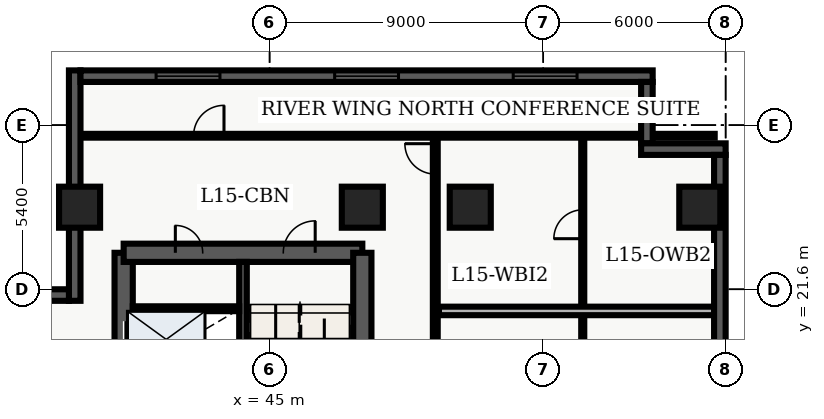
"""IFC4 building model, lengths in metres.
Left out: names, types, materials, properties, quantities, classifications, styles, units other than length and angle.
Written with IfcOpenShell. Run it as: python <this file> out.ifc"""

import sys

from ifc_helpers import new_model, entity, si_unit, converted_unit, direction, frame, origin_with_axes, origin_2d_with_axis, place, context, subcontext, project, spatial, polyline, rectangle, outline, extrude, element, fill, save


model = new_model("IFC4")
c1 = context("Model", 3, precision=1e-05, world=origin_with_axes(), true_north=direction((0.0, 1.0)))
c2 = subcontext(c1, "Body", "Model", "MODEL_VIEW")
j1 = project(units=[si_unit("LENGTHUNIT", "METRE"), converted_unit("PLANEANGLEUNIT", "DEGREE", entity("IfcPlaneAngleMeasure", 0.017), si_unit("PLANEANGLEUNIT", "RADIAN"), dimensions=[0, 0, 0, 0, 0, 0, 0])], contexts=[c1])
p1 = place(None, origin_with_axes())
s1 = spatial("IfcSite", under=j1, at=p1, CompositionType="ELEMENT")
p2 = place(p1, origin_with_axes())
s2 = spatial("IfcBuilding", under=s1, at=p2, CompositionType="ELEMENT")
p3 = place(p2, frame((0.0, 0.0, 63.9), z_axis=(0.0, 0.0, 1.0), x_axis=(1.0, 0.0, 0.0)))
s3 = spatial("IfcBuildingStorey", under=s2, at=p3, CompositionType="ELEMENT", Elevation=63.9)
p4 = place(p3, frame((40.2, 7.2, 0.0), z_axis=(0.0, 0.0, 1.0), x_axis=(0.0, 1.0, 0.0)))
e1 = element("IfcWall", 1, at=p4, inside=s3, PredefinedType="SHEAR", context=c2, shape_type="SweptSolid", body=[
    extrude(outline(polyline([(0.0, -0.3), (15.6, -0.3), (15.6, 0.3), (0.0, 0.3), (0.0, -0.3)])), origin_with_axes(), (0.0, 0.0, 1.0), 3.66),
])
p5 = place(p4, frame((12.75, 0.0, 0.0), z_axis=(0.0, 0.0, 1.0), x_axis=(1.0, 0.0, 0.0)))
e2 = element("IfcOpeningElement", 2, at=p5, cuts=e1, PredefinedType="OPENING", context=c2, shape_type="SweptSolid", body=[
    extrude(rectangle(XDim=1.2, YDim=0.62, at=origin_2d_with_axis()), origin_with_axes(), (0.0, 0.0, 1.0), 2.15),
])
p6 = place(p4, frame((9.3, 0.0, 0.0), z_axis=(0.0, 0.0, 1.0), x_axis=(1.0, 0.0, 0.0)))
e3 = element("IfcOpeningElement", 3, at=p6, cuts=e1, PredefinedType="OPENING", context=c2, shape_type="SweptSolid", body=[
    extrude(rectangle(XDim=0.9, YDim=0.62, at=origin_2d_with_axis()), origin_with_axes(), (0.0, 0.0, 1.0), 2.15),
])
p7 = place(p3, frame((40.2, 22.8, 0.0), z_axis=(0.0, 0.0, 1.0), x_axis=(1.0, 0.0, 0.0)))
e4 = element("IfcWall", 4, at=p7, inside=s3, PredefinedType="SHEAR", context=c2, shape_type="SweptSolid", body=[
    extrude(outline(polyline([(0.0, -0.3), (7.85, -0.3), (7.85, 0.3), (0.0, 0.3), (0.0, -0.3)])), origin_with_axes(), (0.0, 0.0, 1.0), 3.66),
])
p8 = place(p7, frame((5.775, 0.0, 0.0), z_axis=(0.0, 0.0, 1.0), x_axis=(1.0, 0.0, 0.0)))
e5 = element("IfcOpeningElement", 5, at=p8, cuts=e4, PredefinedType="OPENING", context=c2, shape_type="SweptSolid", body=[
    extrude(rectangle(XDim=1.05, YDim=0.62, at=origin_2d_with_axis()), origin_with_axes(), (0.0, 0.0, 1.0), 2.15),
])
p9 = place(p7, frame((2.15, 0.0, 0.0), z_axis=(0.0, 0.0, 1.0), x_axis=(1.0, 0.0, 0.0)))
e6 = element("IfcOpeningElement", 6, at=p9, cuts=e4, PredefinedType="OPENING", context=c2, shape_type="SweptSolid", body=[
    extrude(rectangle(XDim=0.9, YDim=0.62, at=origin_2d_with_axis()), origin_with_axes(), (0.0, 0.0, 1.0), 2.15),
])
p10 = place(p3, frame((48.05, 7.2, 0.0), z_axis=(0.0, 0.0, 1.0), x_axis=(0.0, 1.0, 0.0)))
e7 = element("IfcWall", 7, at=p10, inside=s3, PredefinedType="SHEAR", context=c2, shape_type="SweptSolid", body=[
    extrude(outline(polyline([(0.0, -0.3), (15.6, -0.3), (15.6, 0.3), (0.0, 0.3), (0.0, -0.3)])), origin_with_axes(), (0.0, 0.0, 1.0), 3.66),
])
p11 = place(p10, frame((1.425, 0.0, 0.0), z_axis=(0.0, 0.0, 1.0), x_axis=(1.0, 0.0, 0.0)))
e8 = element("IfcOpeningElement", 8, at=p11, cuts=e7, PredefinedType="OPENING", context=c2, shape_type="SweptSolid", body=[
    extrude(rectangle(XDim=1.05, YDim=0.62, at=origin_2d_with_axis()), origin_with_axes(), (0.0, 0.0, 1.0), 2.15),
])
p12 = place(p10, frame((3.475, 0.0, 0.0), z_axis=(0.0, 0.0, 1.0), x_axis=(1.0, 0.0, 0.0)))
e9 = element("IfcOpeningElement", 9, at=p12, cuts=e7, PredefinedType="OPENING", context=c2, shape_type="SweptSolid", body=[
    extrude(rectangle(XDim=1.05, YDim=0.62, at=origin_2d_with_axis()), origin_with_axes(), (0.0, 0.0, 1.0), 2.15),
])
p13 = place(p10, frame((5.625, 0.0, 0.0), z_axis=(0.0, 0.0, 1.0), x_axis=(1.0, 0.0, 0.0)))
e10 = element("IfcOpeningElement", 10, at=p13, cuts=e7, PredefinedType="OPENING", context=c2, shape_type="SweptSolid", body=[
    extrude(rectangle(XDim=0.95, YDim=0.62, at=origin_2d_with_axis()), origin_with_axes(), (0.0, 0.0, 1.0), 2.15),
])
p14 = place(p3, frame((44.125, 7.5, 0.0), z_axis=(0.0, 0.0, 1.0), x_axis=(0.0, 1.0, 0.0)))
e11 = element("IfcWall", 11, at=p14, inside=s3, PredefinedType="SHEAR", context=c2, shape_type="SweptSolid", body=[
    extrude(outline(polyline([(0.0, -0.125), (15.0, -0.125), (15.0, 0.125), (0.0, 0.125), (0.0, -0.125)])), origin_with_axes(), (0.0, 0.0, 1.0), 3.66),
])
for number, where, z_axis, x_axis in (
    (12, (38.75, 24.3, 0.0), (0.0, 0.0, 1.0), (1.0, 0.0, 0.0)),
    (13, (48.05, 24.3, 0.0), (0.0, 0.0, 1.0), (1.0, 0.0, 0.0)),
    (14, (51.6, 24.3, 0.0), (0.0, 0.0, 1.0), (1.0, 0.0, 0.0)),
    (15, (59.15, 24.3, 0.0), (0.0, 0.0, 1.0), (1.0, 0.0, 0.0)),
):
    element("IfcColumn", number, at=place(p3, frame(where, z_axis=z_axis, x_axis=x_axis)), inside=s3, PredefinedType="COLUMN", context=c2, shape_type="SweptSolid", body=[
        extrude(rectangle(XDim=1.35, YDim=1.35, at=origin_2d_with_axis()), origin_with_axes(), (0.0, 0.0, 1.0), 3.9),
    ])
p15 = place(p3, frame((40.5, 20.96, 0.0), z_axis=(0.0, 0.0, 1.0), x_axis=(1.0, 0.0, 0.0)))
e16 = element("IfcWall", 16, at=p15, inside=s3, PredefinedType="PARTITIONING", context=c2, shape_type="SweptSolid", body=[
    extrude(outline(polyline([(0.0, -0.08), (3.5, -0.08), (3.5, 0.08), (0.0, 0.08), (0.0, -0.08)])), origin_with_axes(), (0.0, 0.0, 1.0), 2.7),
])
p16 = place(p3, frame((50.45, 7.85, 0.0), z_axis=(0.0, 0.0, 1.0), x_axis=(0.0, 1.0, 0.0)))
e17 = element("IfcWall", 17, at=p16, inside=s3, PredefinedType="PARTITIONING", context=c2, shape_type="SweptSolid", body=[
    extrude(outline(polyline([(0.0, -0.08), (18.8, -0.08), (18.8, 0.08), (0.0, 0.08), (0.0, -0.08)])), origin_with_axes(), (0.0, 0.0, 1.0), 2.7),
])
p17 = place(p16, frame((6.549, 0.0, 0.0), z_axis=(0.0, 0.0, 1.0), x_axis=(1.0, 0.0, 0.0)))
e18 = element("IfcOpeningElement", 18, at=p17, cuts=e17, PredefinedType="OPENING", context=c2, shape_type="SweptSolid", body=[
    extrude(rectangle(XDim=1.0, YDim=0.18, at=origin_2d_with_axis()), origin_with_axes(), (0.0, 0.0, 1.0), 2.15),
])
p18 = place(p16, frame((18.039, 0.0, 0.0), z_axis=(0.0, 0.0, 1.0), x_axis=(1.0, 0.0, 0.0)))
e19 = element("IfcOpeningElement", 19, at=p18, cuts=e17, PredefinedType="OPENING", context=c2, shape_type="SweptSolid", body=[
    extrude(rectangle(XDim=1.0, YDim=0.18, at=origin_2d_with_axis()), origin_with_axes(), (0.0, 0.0, 1.0), 2.15),
])
p19 = place(p3, frame((38.76, 26.65, 0.0), z_axis=(0.0, 0.0, 1.0), x_axis=(1.0, 0.0, 0.0)))
e20 = element("IfcWall", 20, at=p19, inside=s3, PredefinedType="PARTITIONING", context=c2, shape_type="SweptSolid", body=[
    extrude(outline(polyline([(0.0, -0.062), (20.88, -0.062), (20.88, 0.062), (0.0, 0.062), (0.0, -0.062)])), origin_with_axes(), (0.0, 0.0, 1.0), 2.7),
])
p20 = place(p19, frame((4.24, 0.0, 0.0), z_axis=(0.0, 0.0, 1.0), x_axis=(1.0, 0.0, 0.0)))
e21 = element("IfcOpeningElement", 21, at=p20, cuts=e20, PredefinedType="OPENING", context=c2, shape_type="SweptSolid", body=[
    extrude(rectangle(XDim=1.0, YDim=0.145, at=origin_2d_with_axis()), origin_with_axes(), (0.0, 0.0, 1.0), 2.15),
])
p21 = place(p3, frame((55.3, 7.98, 0.0), z_axis=(0.0, 0.0, 1.0), x_axis=(0.0, 1.0, 0.0)))
e22 = element("IfcWall", 22, at=p21, inside=s3, PredefinedType="PARTITIONING", context=c2, shape_type="SweptSolid", body=[
    extrude(outline(polyline([(0.0, -0.05), (18.54, -0.05), (18.54, 0.05), (0.0, 0.05), (0.0, -0.05)])), origin_with_axes(), (0.0, 0.0, 1.0), 2.7),
])
p22 = place(p21, frame((6.419, 0.0, 0.0), z_axis=(0.0, 0.0, 1.0), x_axis=(1.0, 0.0, 0.0)))
e23 = element("IfcOpeningElement", 23, at=p22, cuts=e22, PredefinedType="OPENING", context=c2, shape_type="SweptSolid", body=[
    extrude(rectangle(XDim=0.95, YDim=0.12, at=origin_2d_with_axis()), origin_with_axes(), (0.0, 0.0, 1.0), 2.15),
])
p23 = place(p21, frame((15.759, 0.0, 0.0), z_axis=(0.0, 0.0, 1.0), x_axis=(1.0, 0.0, 0.0)))
e24 = element("IfcOpeningElement", 24, at=p23, cuts=e22, PredefinedType="OPENING", context=c2, shape_type="SweptSolid", body=[
    extrude(rectangle(XDim=0.95, YDim=0.12, at=origin_2d_with_axis()), origin_with_axes(), (0.0, 0.0, 1.0), 2.15),
])
p24 = place(p3, frame((50.57, 20.888, 0.0), z_axis=(0.0, 0.0, 1.0), x_axis=(1.0, 0.0, 0.0)))
e25 = element("IfcWall", 25, at=p24, inside=s3, PredefinedType="PARTITIONING", context=c2, shape_type="SweptSolid", body=[
    extrude(outline(polyline([(0.0, -0.14), (9.055, -0.14), (9.055, 0.14), (0.0, 0.14), (0.0, -0.14)])), origin_with_axes(), (0.0, 0.0, 1.0), 2.7),
])
p25 = place(p3, frame((38.59, 21.22, 0.0), z_axis=(0.0, 0.0, 1.0), x_axis=(0.0, 1.0, 0.0)))
e26 = element("IfcWall", 26, at=p25, inside=s3, PredefinedType="SOLIDWALL", context=c2, shape_type="SweptSolid", body=[
    extrude(outline(polyline([(0.0, -0.19), (7.58, -0.19), (7.58, 0.19), (0.0, 0.19), (0.0, -0.19)])), origin_with_axes(), (0.0, 0.0, 1.0), 3.66),
])
p26 = place(p3, frame((38.78, 28.61, 0.0), z_axis=(0.0, 0.0, 1.0), x_axis=(1.0, 0.0, 0.0)))
e27 = element("IfcWall", 27, at=p26, inside=s3, PredefinedType="SOLIDWALL", context=c2, shape_type="SweptSolid", body=[
    extrude(outline(polyline([(0.0, -0.19), (18.82, -0.19), (18.82, 0.19), (0.0, 0.19), (0.0, -0.19)])), origin_with_axes(), (0.0, 0.0, 1.0), 3.66),
])
p27 = place(p26, frame((3.537, 0.0, 0.45), z_axis=(0.0, 0.0, 1.0), x_axis=(1.0, 0.0, 0.0)))
e28 = element("IfcOpeningElement", 28, at=p27, cuts=e27, PredefinedType="OPENING", context=c2, shape_type="SweptSolid", body=[
    extrude(rectangle(XDim=2.1, YDim=0.4, at=origin_2d_with_axis()), origin_with_axes(), (0.0, 0.0, 1.0), 2.2),
])
p28 = place(p26, frame((9.41, 0.0, 0.45), z_axis=(0.0, 0.0, 1.0), x_axis=(1.0, 0.0, 0.0)))
e29 = element("IfcOpeningElement", 29, at=p28, cuts=e27, PredefinedType="OPENING", context=c2, shape_type="SweptSolid", body=[
    extrude(rectangle(XDim=2.1, YDim=0.4, at=origin_2d_with_axis()), origin_with_axes(), (0.0, 0.0, 1.0), 2.2),
])
p29 = place(p26, frame((15.283, 0.0, 0.45), z_axis=(0.0, 0.0, 1.0), x_axis=(1.0, 0.0, 0.0)))
e30 = element("IfcOpeningElement", 30, at=p29, cuts=e27, PredefinedType="OPENING", context=c2, shape_type="SweptSolid", body=[
    extrude(rectangle(XDim=2.1, YDim=0.4, at=origin_2d_with_axis()), origin_with_axes(), (0.0, 0.0, 1.0), 2.2),
])
p30 = place(p3, frame((57.41, 28.42, 0.0), z_axis=(0.0, 0.0, 1.0), x_axis=(0.0, -1.0, 0.0)))
e31 = element("IfcWall", 31, at=p30, inside=s3, PredefinedType="SOLIDWALL", context=c2, shape_type="SweptSolid", body=[
    extrude(outline(polyline([(0.0, -0.19), (2.02, -0.19), (2.02, 0.19), (0.0, 0.19), (0.0, -0.19)])), origin_with_axes(), (0.0, 0.0, 1.0), 3.66),
])
p31 = place(p3, frame((57.22, 26.21, 0.0), z_axis=(0.0, 0.0, 1.0), x_axis=(1.0, 0.0, 0.0)))
e32 = element("IfcWall", 32, at=p31, inside=s3, PredefinedType="SOLIDWALL", context=c2, shape_type="SweptSolid", body=[
    extrude(outline(polyline([(0.0, -0.19), (2.78, -0.19), (2.78, 0.19), (0.0, 0.19), (0.0, -0.19)])), origin_with_axes(), (0.0, 0.0, 1.0), 3.66),
])
p32 = place(p3, frame((59.81, 26.02, 0.0), z_axis=(0.0, 0.0, 1.0), x_axis=(0.0, -1.0, 0.0)))
e33 = element("IfcWall", 33, at=p32, inside=s3, PredefinedType="SOLIDWALL", context=c2, shape_type="SweptSolid", body=[
    extrude(outline(polyline([(0.0, -0.19), (23.62, -0.19), (23.62, 0.19), (0.0, 0.19), (0.0, -0.19)])), origin_with_axes(), (0.0, 0.0, 1.0), 3.66),
])
p33 = place(p32, frame((20.218, 0.0, 0.45), z_axis=(0.0, 0.0, 1.0), x_axis=(1.0, 0.0, 0.0)))
e34 = element("IfcOpeningElement", 34, at=p33, cuts=e33, PredefinedType="OPENING", context=c2, shape_type="SweptSolid", body=[
    extrude(rectangle(XDim=2.1, YDim=0.4, at=origin_2d_with_axis()), origin_with_axes(), (0.0, 0.0, 1.0), 2.2),
])
p34 = place(p3, frame((21.22, 21.41, 0.0), z_axis=(0.0, 0.0, 1.0), x_axis=(1.0, 0.0, 0.0)))
e35 = element("IfcWall", 35, at=p34, inside=s3, PredefinedType="SOLIDWALL", context=c2, shape_type="SweptSolid", body=[
    extrude(outline(polyline([(0.0, -0.19), (17.18, -0.19), (17.18, 0.19), (0.0, 0.19), (0.0, -0.19)])), origin_with_axes(), (0.0, 0.0, 1.0), 3.66),
])
p35 = place(p34, frame((8.59, 0.0, 0.45), z_axis=(0.0, 0.0, 1.0), x_axis=(1.0, 0.0, 0.0)))
e36 = element("IfcOpeningElement", 36, at=p35, cuts=e35, PredefinedType="OPENING", context=c2, shape_type="SweptSolid", body=[
    extrude(rectangle(XDim=2.1, YDim=0.4, at=origin_2d_with_axis()), origin_with_axes(), (0.0, 0.0, 1.0), 2.2),
])
p36 = place(p34, frame((13.467, 0.0, 0.45), z_axis=(0.0, 0.0, 1.0), x_axis=(1.0, 0.0, 0.0)))
e37 = element("IfcOpeningElement", 37, at=p36, cuts=e35, PredefinedType="OPENING", context=c2, shape_type="SweptSolid", body=[
    extrude(rectangle(XDim=2.1, YDim=0.4, at=origin_2d_with_axis()), origin_with_axes(), (0.0, 0.0, 1.0), 2.2),
])
p37 = place(p4, frame((12.75, 0.0, 0.0), z_axis=(0.0, 0.0, 1.0), x_axis=(1.0, 0.0, 0.0)))
e38 = element("IfcDoor", 38, at=p37, inside=s3, OperationType="DOUBLE_DOOR_SLIDING", PredefinedType="DOOR", context=c2, shape_type="SweptSolid", body=[
    extrude(rectangle(XDim=1.2, YDim=0.09, at=origin_2d_with_axis()), origin_with_axes(), (0.0, 0.0, 1.0), 2.15),
])
fill(e2, e38)
p38 = place(p7, frame((5.775, 0.0, 0.0), z_axis=(0.0, 0.0, 1.0), x_axis=(1.0, 0.0, 0.0)))
e39 = element("IfcDoor", 39, at=p38, inside=s3, OperationType="SINGLE_SWING_RIGHT", PredefinedType="DOOR", context=c2, shape_type="SweptSolid", body=[
    extrude(rectangle(XDim=1.05, YDim=0.09, at=origin_2d_with_axis()), origin_with_axes(), (0.0, 0.0, 1.0), 2.15),
])
fill(e5, e39)
p39 = place(p7, frame((2.15, 0.0, 0.0), z_axis=(0.0, 0.0, 1.0), x_axis=(1.0, 0.0, 0.0)))
e40 = element("IfcDoor", 40, at=p39, inside=s3, OperationType="SINGLE_SWING_LEFT", PredefinedType="DOOR", context=c2, shape_type="SweptSolid", body=[
    extrude(rectangle(XDim=0.9, YDim=0.09, at=origin_2d_with_axis()), origin_with_axes(), (0.0, 0.0, 1.0), 2.15),
])
fill(e6, e40)
p40 = place(p19, frame((4.24, 0.0, 0.0), z_axis=(0.0, 0.0, 1.0), x_axis=(1.0, 0.0, 0.0)))
e41 = element("IfcDoor", 41, at=p40, inside=s3, OperationType="SINGLE_SWING_RIGHT", PredefinedType="DOOR", context=c2, shape_type="SweptSolid", body=[
    extrude(rectangle(XDim=1.0, YDim=0.075, at=origin_2d_with_axis()), origin_with_axes(), (0.0, 0.0, 1.0), 2.15),
])
fill(e21, e41)
p41 = place(p21, frame((15.759, 0.0, 0.0), z_axis=(0.0, 0.0, 1.0), x_axis=(1.0, 0.0, 0.0)))
e42 = element("IfcDoor", 42, at=p41, inside=s3, OperationType="SINGLE_SWING_LEFT", PredefinedType="DOOR", context=c2, shape_type="SweptSolid", body=[
    extrude(rectangle(XDim=0.95, YDim=0.06, at=origin_2d_with_axis()), origin_with_axes(), (0.0, 0.0, 1.0), 2.15),
])
fill(e24, e42)
p42 = place(p16, frame((18.039, 0.0, 0.0), z_axis=(0.0, 0.0, 1.0), x_axis=(1.0, 0.0, 0.0)))
e43 = element("IfcDoor", 43, at=p42, inside=s3, OperationType="SINGLE_SWING_RIGHT", PredefinedType="DOOR", context=c2, shape_type="SweptSolid", body=[
    extrude(rectangle(XDim=1.0, YDim=0.09, at=origin_2d_with_axis()), origin_with_axes(), (0.0, 0.0, 1.0), 2.15),
])
fill(e19, e43)
p43 = place(p26, frame((3.537, 0.0, 0.45), z_axis=(0.0, 0.0, 1.0), x_axis=(1.0, 0.0, 0.0)))
e44 = element("IfcWindow", 44, at=p43, inside=s3, PredefinedType="WINDOW", context=c2, shape_type="SweptSolid", body=[
    extrude(rectangle(XDim=2.1, YDim=0.09, at=origin_2d_with_axis()), origin_with_axes(), (0.0, 0.0, 1.0), 2.2),
])
fill(e28, e44)
p44 = place(p26, frame((9.41, 0.0, 0.45), z_axis=(0.0, 0.0, 1.0), x_axis=(1.0, 0.0, 0.0)))
e45 = element("IfcWindow", 45, at=p44, inside=s3, PredefinedType="WINDOW", context=c2, shape_type="SweptSolid", body=[
    extrude(rectangle(XDim=2.1, YDim=0.09, at=origin_2d_with_axis()), origin_with_axes(), (0.0, 0.0, 1.0), 2.2),
])
fill(e29, e45)
p45 = place(p26, frame((15.283, 0.0, 0.45), z_axis=(0.0, 0.0, 1.0), x_axis=(1.0, 0.0, 0.0)))
e46 = element("IfcWindow", 46, at=p45, inside=s3, PredefinedType="WINDOW", context=c2, shape_type="SweptSolid", body=[
    extrude(rectangle(XDim=2.1, YDim=0.09, at=origin_2d_with_axis()), origin_with_axes(), (0.0, 0.0, 1.0), 2.2),
])
fill(e30, e46)
save(model, sys.argv[1])
